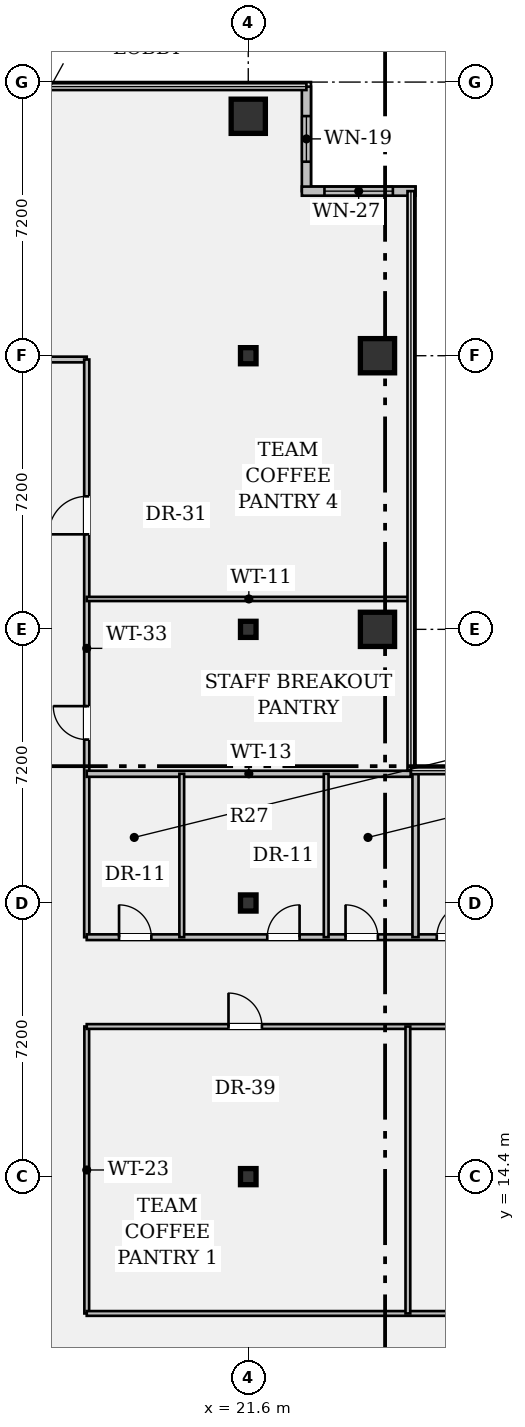
"""IFC4 building model, lengths in metres.
Left out: names, types, materials, properties, quantities, classifications, styles, units other than length and angle.
Written with IfcOpenShell. Run it as: python <this file> out.ifc"""

import sys

from ifc_helpers import new_model, si_unit, direction, frame, frame_2d, origin, origin_2d, place, context, subcontext, project, spatial, rectangle, hollow_rectangle, i_section, extrude, element, fill, save


model = new_model("IFC4")
c1 = context("Model", 3, precision=1e-05, world=origin(), true_north=direction((0.0, 1.0)))
c2 = subcontext(c1, "Body", "Model", "MODEL_VIEW")
j1 = project(units=[si_unit("LENGTHUNIT", "METRE"), si_unit("PLANEANGLEUNIT", "RADIAN")], contexts=[c1])
p1 = place(None, origin())
s1 = spatial("IfcSite", under=j1, at=p1, CompositionType="ELEMENT")
p2 = place(p1, origin())
s2 = spatial("IfcBuilding", under=s1, at=p2, CompositionType="ELEMENT")
p3 = place(p2, frame((0.0, 0.0, 121.45)))
s3 = spatial("IfcBuildingStorey", under=s2, at=p3, CompositionType="ELEMENT", Elevation=121.45)
for number, where, z_axis, x_axis in (
    (1, (21.6, 14.4, 0.0), (0.0, 0.0, 1.0), (1.0, 0.0, 0.0)),
    (2, (21.6, 21.6, 0.0), (0.0, 0.0, 1.0), (1.0, 0.0, 0.0)),
    (3, (21.6, 28.8, 0.0), (0.0, 0.0, 1.0), (1.0, 0.0, 0.0)),
    (4, (21.6, 36.0, 0.0), (0.0, 0.0, 1.0), (1.0, 0.0, 0.0)),
):
    element("IfcColumn", number, at=place(p3, frame(where, z_axis=z_axis, x_axis=x_axis)), inside=s3, PredefinedType="COLUMN", context=c2, shape_type="SweptSolid", body=[
        extrude(i_section(OverallWidth=0.409, OverallDepth=0.424, WebThickness=0.033, FlangeThickness=0.052, FilletRadius=0.018, at=origin_2d()), origin(), (0.0, 0.0, 1.0), 3.58),
    ])
for number, where, z_axis, x_axis in (
    (5, (21.6, 42.3, 0.0), (0.0, 0.0, 1.0), (1.0, 0.0, 0.0)),
    (6, (25.0, 28.8, 0.0), (0.0, 0.0, 1.0), (1.0, 0.0, 0.0)),
    (7, (25.0, 36.0, 0.0), (0.0, 0.0, 1.0), (1.0, 0.0, 0.0)),
):
    element("IfcColumn", number, at=place(p3, frame(where, z_axis=z_axis, x_axis=x_axis)), inside=s3, PredefinedType="COLUMN", context=c2, shape_type="SweptSolid", body=[
        extrude(hollow_rectangle(XDim=0.9, YDim=0.9, WallThickness=0.055, at=origin_2d()), origin(), (0.0, 0.0, 1.0), 3.58),
    ])
p4 = place(p3, frame((23.13, 43.08, 0.0), z_axis=(0.0, 0.0, 1.0), x_axis=(0.0, -1.0, 0.0)))
e8 = element("IfcWall", 8, at=p4, inside=s3, PredefinedType="STANDARD", context=c2, shape_type="SweptSolid", body=[
    extrude(rectangle(XDim=2.75, YDim=0.24, at=frame_2d((1.375, 0.0))), origin(), (0.0, 0.0, 1.0), 3.58),
])
p5 = place(p4, frame((0.775, 0.0, 0.95)))
e9 = element("IfcOpeningElement", 9, at=p5, cuts=e8, PredefinedType="OPENING", context=c2, shape_type="SweptSolid", body=[
    extrude(rectangle(XDim=1.2, YDim=1.8, at=frame_2d((0.6, 0.9))), frame((0.0, 0.132, 0.0), z_axis=(0.0, -1.0, 0.0), x_axis=(1.0, 0.0, 0.0)), (0.0, 0.0, 1.0), 0.264),
])
p6 = place(p3, frame((23.01, 40.33, 0.0), z_axis=(0.0, 0.0, 1.0), x_axis=(1.0, 0.0, 0.0)))
e10 = element("IfcWall", 10, at=p6, inside=s3, PredefinedType="STANDARD", context=c2, shape_type="SweptSolid", body=[
    extrude(rectangle(XDim=2.99, YDim=0.24, at=frame_2d((1.495, 0.0))), origin(), (0.0, 0.0, 1.0), 3.58),
])
p7 = place(p6, frame((0.595, 0.0, 0.95)))
e11 = element("IfcOpeningElement", 11, at=p7, cuts=e10, PredefinedType="OPENING", context=c2, shape_type="SweptSolid", body=[
    extrude(rectangle(XDim=1.8, YDim=1.35, at=frame_2d((0.9, 0.675))), frame((0.0, 0.132, 0.0), z_axis=(0.0, -1.0, 0.0), x_axis=(1.0, 0.0, 0.0)), (0.0, 0.0, 1.0), 0.264),
])
p8 = place(p3, frame((14.4, 35.9, 0.0), z_axis=(0.0, 0.0, 1.0), x_axis=(1.0, 0.0, 0.0)))
e12 = element("IfcWall", 12, at=p8, inside=s3, PredefinedType="PARTITIONING", context=c2, shape_type="SweptSolid", body=[
    extrude(rectangle(XDim=2.95, YDim=0.15, at=frame_2d((1.475, 0.0))), origin(), (0.0, 0.0, 1.0), 2.869),
])
p9 = place(p8, frame((0.95, 0.0, 0.0)))
e13 = element("IfcOpeningElement", 13, at=p9, cuts=e12, PredefinedType="OPENING", context=c2, shape_type="SweptSolid", body=[
    extrude(rectangle(XDim=1.0, YDim=2.15, at=frame_2d((0.5, 1.075))), frame((0.0, 0.087, 0.0), z_axis=(0.0, -1.0, 0.0), x_axis=(1.0, 0.0, 0.0)), (0.0, 0.0, 1.0), 0.174),
])
p10 = place(p3, frame((17.35, 20.7, 0.0), z_axis=(0.0, 0.0, 1.0), x_axis=(0.0, 1.0, 0.0)))
e14 = element("IfcWall", 14, at=p10, inside=s3, PredefinedType="PARTITIONING", context=c2, shape_type="SweptSolid", body=[
    extrude(rectangle(XDim=15.2, YDim=0.135, at=frame_2d((7.6, 0.0))), origin(), (0.0, 0.0, 1.0), 2.869),
])
p11 = place(p10, frame((5.2, 0.0, 0.0)))
e15 = element("IfcOpeningElement", 15, at=p11, cuts=e14, PredefinedType="OPENING", context=c2, shape_type="SweptSolid", body=[
    extrude(rectangle(XDim=0.88, YDim=2.15, at=frame_2d((0.44, 1.075))), frame((0.0, 0.08, 0.0), z_axis=(0.0, -1.0, 0.0), x_axis=(1.0, 0.0, 0.0)), (0.0, 0.0, 1.0), 0.159),
])
p12 = place(p10, frame((10.6, 0.0, 0.0)))
e16 = element("IfcOpeningElement", 16, at=p12, cuts=e14, PredefinedType="OPENING", context=c2, shape_type="SweptSolid", body=[
    extrude(rectangle(XDim=1.0, YDim=2.15, at=frame_2d((0.5, 1.075))), frame((0.0, 0.08, 0.0), z_axis=(0.0, -1.0, 0.0), x_axis=(1.0, 0.0, 0.0)), (0.0, 0.0, 1.0), 0.159),
])
p13 = place(p3, frame((17.35, 20.7, 0.0), z_axis=(0.0, 0.0, 1.0), x_axis=(1.0, 0.0, 0.0)))
e17 = element("IfcWall", 17, at=p13, inside=s3, PredefinedType="PARTITIONING", context=c2, shape_type="SweptSolid", body=[
    extrude(rectangle(XDim=24.15, YDim=0.15, at=frame_2d((12.075, 0.0))), origin(), (0.0, 0.0, 1.0), 2.869),
])
p14 = place(p13, frame((0.85, 0.0, 0.0)))
e18 = element("IfcOpeningElement", 18, at=p14, cuts=e17, PredefinedType="OPENING", context=c2, shape_type="SweptSolid", body=[
    extrude(rectangle(XDim=0.85, YDim=2.15, at=frame_2d((0.425, 1.075))), frame((0.0, 0.087, 0.0), z_axis=(0.0, -1.0, 0.0), x_axis=(1.0, 0.0, 0.0)), (0.0, 0.0, 1.0), 0.174),
])
p15 = place(p13, frame((4.75, 0.0, 0.0)))
e19 = element("IfcOpeningElement", 19, at=p15, cuts=e17, PredefinedType="OPENING", context=c2, shape_type="SweptSolid", body=[
    extrude(rectangle(XDim=0.85, YDim=2.15, at=frame_2d((0.425, 1.075))), frame((0.0, 0.087, 0.0), z_axis=(0.0, -1.0, 0.0), x_axis=(1.0, 0.0, 0.0)), (0.0, 0.0, 1.0), 0.174),
])
p16 = place(p13, frame((6.81, 0.0, 0.0)))
e20 = element("IfcOpeningElement", 20, at=p16, cuts=e17, PredefinedType="OPENING", context=c2, shape_type="SweptSolid", body=[
    extrude(rectangle(XDim=0.85, YDim=2.15, at=frame_2d((0.425, 1.075))), frame((0.0, 0.087, 0.0), z_axis=(0.0, -1.0, 0.0), x_axis=(1.0, 0.0, 0.0)), (0.0, 0.0, 1.0), 0.174),
])
p17 = place(p13, frame((9.21, 0.0, 0.0)))
e21 = element("IfcOpeningElement", 21, at=p17, cuts=e17, PredefinedType="OPENING", context=c2, shape_type="SweptSolid", body=[
    extrude(rectangle(XDim=0.88, YDim=2.15, at=frame_2d((0.44, 1.075))), frame((0.0, 0.087, 0.0), z_axis=(0.0, -1.0, 0.0), x_axis=(1.0, 0.0, 0.0)), (0.0, 0.0, 1.0), 0.174),
])
p18 = place(p3, frame((17.35, 10.8, 0.0), z_axis=(0.0, 0.0, 1.0), x_axis=(0.0, 1.0, 0.0)))
e22 = element("IfcWall", 22, at=p18, inside=s3, PredefinedType="PARTITIONING", context=c2, shape_type="SweptSolid", body=[
    extrude(rectangle(XDim=7.55, YDim=0.125, at=frame_2d((3.775, 0.0))), origin(), (0.0, 0.0, 1.0), 2.869),
])
p19 = place(p3, frame((17.35, 10.8, 0.0), z_axis=(0.0, 0.0, 1.0), x_axis=(1.0, 0.0, 0.0)))
e23 = element("IfcWall", 23, at=p19, inside=s3, PredefinedType="PARTITIONING", context=c2, shape_type="SweptSolid", body=[
    extrude(rectangle(XDim=21.8, YDim=0.125, at=frame_2d((10.9, 0.0))), origin(), (0.0, 0.0, 1.0), 2.869),
])
p20 = place(p3, frame((17.35, 18.35, 0.0), z_axis=(0.0, 0.0, 1.0), x_axis=(1.0, 0.0, 0.0)))
e24 = element("IfcWall", 24, at=p20, inside=s3, PredefinedType="PARTITIONING", context=c2, shape_type="SweptSolid", body=[
    extrude(rectangle(XDim=21.8, YDim=0.125, at=frame_2d((10.9, 0.0))), origin(), (0.0, 0.0, 1.0), 2.869),
])
p21 = place(p20, frame((3.73, 0.0, 0.0)))
e25 = element("IfcOpeningElement", 25, at=p21, cuts=e24, PredefinedType="OPENING", context=c2, shape_type="SweptSolid", body=[
    extrude(rectangle(XDim=0.88, YDim=2.15, at=frame_2d((0.44, 1.075))), frame((0.0, 0.074, 0.0), z_axis=(0.0, -1.0, 0.0), x_axis=(1.0, 0.0, 0.0)), (0.0, 0.0, 1.0), 0.149),
])
p22 = place(p20, frame((11.85, 0.0, 0.0)))
e26 = element("IfcOpeningElement", 26, at=p22, cuts=e24, PredefinedType="OPENING", context=c2, shape_type="SweptSolid", body=[
    extrude(rectangle(XDim=0.88, YDim=2.15, at=frame_2d((0.44, 1.075))), frame((0.0, 0.074, 0.0), z_axis=(0.0, -1.0, 0.0), x_axis=(1.0, 0.0, 0.0)), (0.0, 0.0, 1.0), 0.149),
])
p23 = place(p20, frame((18.52, 0.0, 0.0)))
e27 = element("IfcOpeningElement", 27, at=p23, cuts=e24, PredefinedType="OPENING", context=c2, shape_type="SweptSolid", body=[
    extrude(rectangle(XDim=0.88, YDim=2.15, at=frame_2d((0.44, 1.075))), frame((0.0, 0.074, 0.0), z_axis=(0.0, -1.0, 0.0), x_axis=(1.0, 0.0, 0.0)), (0.0, 0.0, 1.0), 0.149),
])
p24 = place(p3, frame((25.8, 10.8, 0.0), z_axis=(0.0, 0.0, 1.0), x_axis=(0.0, 1.0, 0.0)))
e28 = element("IfcWall", 28, at=p24, inside=s3, PredefinedType="PARTITIONING", context=c2, shape_type="SweptSolid", body=[
    extrude(rectangle(XDim=7.55, YDim=0.125, at=frame_2d((3.775, 0.0))), origin(), (0.0, 0.0, 1.0), 2.869),
])
p25 = place(p3, frame((17.35, 25.0, 0.0), z_axis=(0.0, 0.0, 1.0), x_axis=(1.0, 0.0, 0.0)))
e29 = element("IfcWall", 29, at=p25, inside=s3, PredefinedType="PARTITIONING", context=c2, shape_type="SweptSolid", body=[
    extrude(rectangle(XDim=8.53, YDim=0.16, at=frame_2d((4.265, 0.0))), origin(), (0.0, 0.0, 1.0), 2.869),
])
for number, where, z_axis, x_axis in (
    (30, (19.85, 20.7, 0.0), (0.0, 0.0, 1.0), (0.0, 1.0, 0.0)),
    (31, (23.65, 20.7, 0.0), (0.0, 0.0, 1.0), (0.0, 1.0, 0.0)),
):
    element("IfcWall", number, at=place(p3, frame(where, z_axis=z_axis, x_axis=x_axis)), inside=s3, PredefinedType="PARTITIONING", context=c2, shape_type="SweptSolid", body=[
        extrude(rectangle(XDim=4.3, YDim=0.125, at=frame_2d((2.15, 0.0))), origin(), (0.0, 0.0, 1.0), 2.869),
    ])
p26 = place(p3, frame((17.35, 29.6, 0.0), z_axis=(0.0, 0.0, 1.0), x_axis=(1.0, 0.0, 0.0)))
e32 = element("IfcWall", 32, at=p26, inside=s3, PredefinedType="PARTITIONING", context=c2, shape_type="SweptSolid", body=[
    extrude(rectangle(XDim=8.53, YDim=0.11, at=frame_2d((4.265, 0.0))), origin(), (0.0, 0.0, 1.0), 2.869),
])
p27 = place(p3, frame((26.0, 20.7, 0.0), z_axis=(0.0, 0.0, 1.0), x_axis=(0.0, 1.0, 0.0)))
e33 = element("IfcWall", 33, at=p27, inside=s3, PredefinedType="PARTITIONING", context=c2, shape_type="SweptSolid", body=[
    extrude(rectangle(XDim=4.38, YDim=0.16, at=frame_2d((2.19, 0.0))), origin(), (0.0, 0.0, 1.0), 2.869),
])
p28 = place(p5, origin())
e34 = element("IfcWindow", 34, at=p28, inside=s3, PartitioningType="SINGLE_PANEL", PredefinedType="WINDOW", context=c2, shape_type="SweptSolid", body=[
    extrude(rectangle(XDim=1.2, YDim=1.8, at=frame_2d((0.6, 0.9))), frame((0.0, 0.03, 0.0), z_axis=(0.0, -1.0, 0.0), x_axis=(1.0, 0.0, 0.0)), (0.0, 0.0, 1.0), 0.06),
])
fill(e9, e34)
p29 = place(p7, origin())
e35 = element("IfcWindow", 35, at=p29, inside=s3, PartitioningType="SINGLE_PANEL", PredefinedType="WINDOW", context=c2, shape_type="SweptSolid", body=[
    extrude(rectangle(XDim=1.8, YDim=1.35, at=frame_2d((0.9, 0.675))), frame((0.0, 0.03, 0.0), z_axis=(0.0, -1.0, 0.0), x_axis=(1.0, 0.0, 0.0)), (0.0, 0.0, 1.0), 0.06),
])
fill(e11, e35)
p30 = place(p21, origin())
e36 = element("IfcDoor", 36, at=p30, inside=s3, OperationType="SINGLE_SWING_LEFT", PredefinedType="DOOR", context=c2, shape_type="SweptSolid", body=[
    extrude(rectangle(XDim=0.88, YDim=2.15, at=frame_2d((0.44, 1.075))), frame((0.0, 0.025, 0.0), z_axis=(0.0, -1.0, 0.0), x_axis=(1.0, 0.0, 0.0)), (0.0, 0.0, 1.0), 0.05),
])
fill(e25, e36)
p31 = place(p14, origin())
e37 = element("IfcDoor", 37, at=p31, inside=s3, OperationType="SINGLE_SWING_LEFT", PredefinedType="DOOR", context=c2, shape_type="SweptSolid", body=[
    extrude(rectangle(XDim=0.85, YDim=2.15, at=frame_2d((0.425, 1.075))), frame((0.0, 0.025, 0.0), z_axis=(0.0, -1.0, 0.0), x_axis=(1.0, 0.0, 0.0)), (0.0, 0.0, 1.0), 0.05),
])
fill(e18, e37)
p32 = place(p15, origin())
e38 = element("IfcDoor", 38, at=p32, inside=s3, OperationType="SINGLE_SWING_RIGHT", PredefinedType="DOOR", context=c2, shape_type="SweptSolid", body=[
    extrude(rectangle(XDim=0.85, YDim=2.15, at=frame_2d((0.425, 1.075))), frame((0.0, 0.025, 0.0), z_axis=(0.0, -1.0, 0.0), x_axis=(1.0, 0.0, 0.0)), (0.0, 0.0, 1.0), 0.05),
])
fill(e19, e38)
p33 = place(p16, origin())
e39 = element("IfcDoor", 39, at=p33, inside=s3, OperationType="SINGLE_SWING_LEFT", PredefinedType="DOOR", context=c2, shape_type="SweptSolid", body=[
    extrude(rectangle(XDim=0.85, YDim=2.15, at=frame_2d((0.425, 1.075))), frame((0.0, 0.025, 0.0), z_axis=(0.0, -1.0, 0.0), x_axis=(1.0, 0.0, 0.0)), (0.0, 0.0, 1.0), 0.05),
])
fill(e20, e39)
p34 = place(p11, origin())
e40 = element("IfcDoor", 40, at=p34, inside=s3, OperationType="SINGLE_SWING_RIGHT", PredefinedType="DOOR", context=c2, shape_type="SweptSolid", body=[
    extrude(rectangle(XDim=0.88, YDim=2.15, at=frame_2d((0.44, 1.075))), frame((0.0, 0.025, 0.0), z_axis=(0.0, -1.0, 0.0), x_axis=(1.0, 0.0, 0.0)), (0.0, 0.0, 1.0), 0.05),
])
fill(e15, e40)
p35 = place(p12, origin())
e41 = element("IfcDoor", 41, at=p35, inside=s3, OperationType="SINGLE_SWING_LEFT", PredefinedType="DOOR", context=c2, shape_type="SweptSolid", body=[
    extrude(rectangle(XDim=1.0, YDim=2.15, at=frame_2d((0.5, 1.075))), frame((0.0, 0.025, 0.0), z_axis=(0.0, -1.0, 0.0), x_axis=(1.0, 0.0, 0.0)), (0.0, 0.0, 1.0), 0.05),
])
fill(e16, e41)
p36 = place(p17, origin())
e42 = element("IfcDoor", 42, at=p36, inside=s3, OperationType="SINGLE_SWING_RIGHT", PredefinedType="DOOR", context=c2, shape_type="SweptSolid", body=[
    extrude(rectangle(XDim=0.88, YDim=2.15, at=frame_2d((0.44, 1.075))), frame((0.0, 0.025, 0.0), z_axis=(0.0, -1.0, 0.0), x_axis=(1.0, 0.0, 0.0)), (0.0, 0.0, 1.0), 0.05),
])
fill(e21, e42)
save(model, sys.argv[1])
